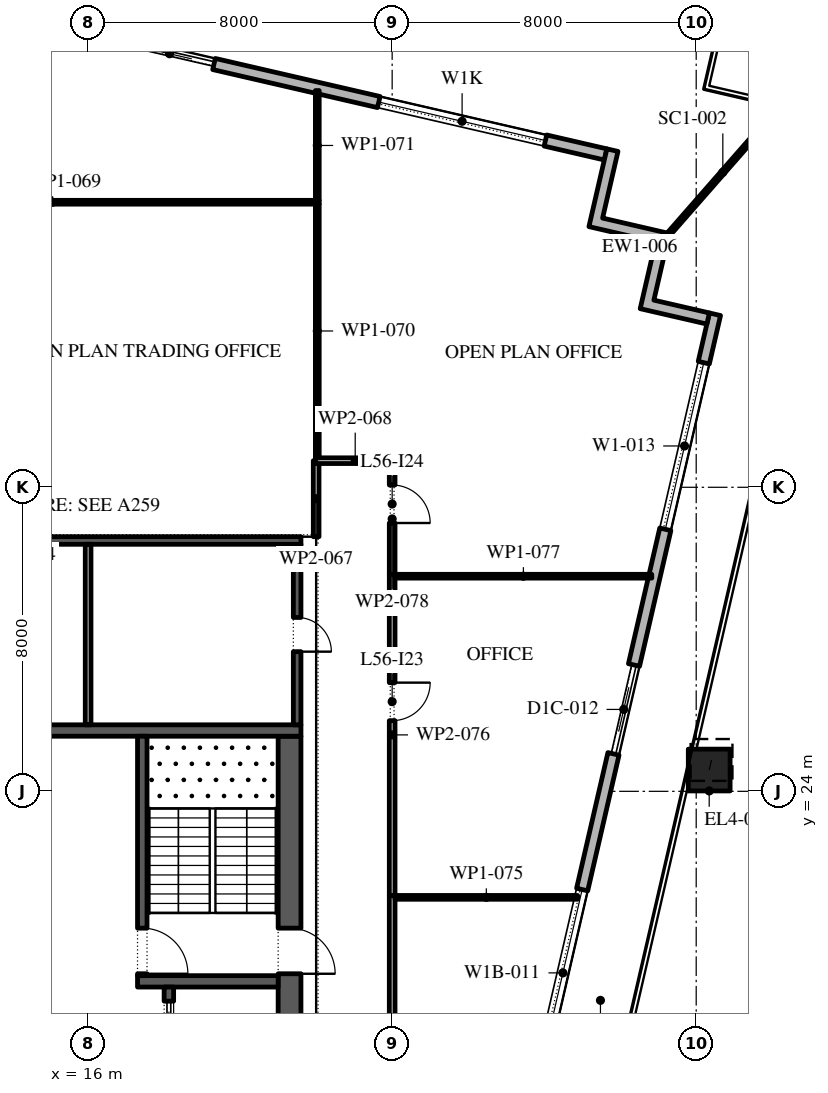
"""IFC4 building model, lengths in metres.
Left out: names, types, materials, properties, quantities, classifications, styles, units other than length and angle.
Written with IfcOpenShell. Run it as: python <this file> out.ifc"""

import sys

from ifc_helpers import new_model, si_unit, direction, frame, frame_2d, origin, origin_2d, place, context, subcontext, project, spatial, polyline, rectangle, outline, extrude, element, fill, save


model = new_model("IFC4")
c1 = context("Model", 3, precision=1e-05, world=origin(), true_north=direction((0.0, 1.0)))
c2 = subcontext(c1, "Body", "Model", "MODEL_VIEW")
j1 = project(units=[si_unit("LENGTHUNIT", "METRE"), si_unit("PLANEANGLEUNIT", "RADIAN")], contexts=[c1])
p1 = place(None, origin())
s1 = spatial("IfcSite", under=j1, at=p1, CompositionType="ELEMENT")
p2 = place(p1, origin())
s2 = spatial("IfcBuilding", under=s1, at=p2, CompositionType="ELEMENT")
p3 = place(p2, frame((0.0, 0.0, 259.8)))
s3 = spatial("IfcBuildingStorey", under=s2, at=p3, CompositionType="ELEMENT", Elevation=259.8)
p4 = place(p3, frame((32.342, 24.56, 0.0), z_axis=(0.014559788571, 0.063169759976, 0.997896584813), x_axis=(-0.97445148511, 0.224598092528, 0.0)))
e1 = element("IfcColumn", 1, at=p4, inside=s3, PredefinedType="COLUMN", context=c2, shape_type="SweptSolid", body=[
    extrude(rectangle(XDim=1.1, YDim=1.1, at=origin_2d()), origin(), (0.0, 0.0, 1.0), 4.209),
])
p5 = place(p3, frame((21.359, -11.678, 0.0), z_axis=(0.0, 0.0, 1.0), x_axis=(0.224949198343, 0.974370493275, 0.0)))
e2 = element("IfcWall", 2, at=p5, inside=s3, PredefinedType="STANDARD", context=c2, shape_type="SweptSolid", body=[
    extrude(rectangle(XDim=49.5, YDim=0.3, at=frame_2d((24.75, 0.0))), origin(), (0.0, 0.0, 1.0), 4.0),
])
p6 = place(p5, frame((1.157, 0.0, 0.45)))
e3 = element("IfcOpeningElement", 3, at=p6, cuts=e2, PredefinedType="OPENING", context=c2, shape_type="SweptSolid", body=[
    extrude(rectangle(XDim=4.5, YDim=3.05, at=frame_2d((2.25, 1.525))), frame((0.0, 0.16, 0.0), z_axis=(0.0, -1.0, 0.0), x_axis=(1.0, 0.0, 0.0)), (0.0, 0.0, 1.0), 0.32),
])
p7 = place(p5, frame((8.121, 0.0, 0.45)))
e4 = element("IfcOpeningElement", 4, at=p7, cuts=e2, PredefinedType="OPENING", context=c2, shape_type="SweptSolid", body=[
    extrude(rectangle(XDim=4.5, YDim=3.05, at=frame_2d((2.25, 1.525))), frame((0.0, 0.16, 0.0), z_axis=(0.0, -1.0, 0.0), x_axis=(1.0, 0.0, 0.0)), (0.0, 0.0, 1.0), 0.32),
])
p8 = place(p5, frame((15.236, 0.0, 0.45)))
e5 = element("IfcOpeningElement", 5, at=p8, cuts=e2, PredefinedType="OPENING", context=c2, shape_type="SweptSolid", body=[
    extrude(rectangle(XDim=4.5, YDim=3.05, at=frame_2d((2.25, 1.525))), frame((0.0, 0.16, 0.0), z_axis=(0.0, -1.0, 0.0), x_axis=(1.0, 0.0, 0.0)), (0.0, 0.0, 1.0), 0.32),
])
p9 = place(p5, frame((22.35, 0.0, 0.45)))
e6 = element("IfcOpeningElement", 6, at=p9, cuts=e2, PredefinedType="OPENING", context=c2, shape_type="SweptSolid", body=[
    extrude(rectangle(XDim=4.5, YDim=3.05, at=frame_2d((2.25, 1.525))), frame((0.0, 0.16, 0.0), z_axis=(0.0, -1.0, 0.0), x_axis=(1.0, 0.0, 0.0)), (0.0, 0.0, 1.0), 0.32),
])
p10 = place(p5, frame((29.464, 0.0, 0.45)))
e7 = element("IfcOpeningElement", 7, at=p10, cuts=e2, PredefinedType="OPENING", context=c2, shape_type="SweptSolid", body=[
    extrude(rectangle(XDim=4.5, YDim=2.95, at=frame_2d((2.25, 1.475))), frame((0.0, 0.16, 0.0), z_axis=(0.0, -1.0, 0.0), x_axis=(1.0, 0.0, 0.0)), (0.0, 0.0, 1.0), 0.32),
])
p11 = place(p5, frame((37.628, 0.0, 0.0)))
e8 = element("IfcOpeningElement", 8, at=p11, cuts=e2, PredefinedType="OPENING", context=c2, shape_type="SweptSolid", body=[
    extrude(rectangle(XDim=2.4, YDim=3.325, at=frame_2d((1.2, 1.663))), frame((0.0, 0.16, 0.0), z_axis=(0.0, -1.0, 0.0), x_axis=(1.0, 0.0, 0.0)), (0.0, 0.0, 1.0), 0.32),
])
p12 = place(p5, frame((43.693, 0.0, 0.45)))
e9 = element("IfcOpeningElement", 9, at=p12, cuts=e2, PredefinedType="OPENING", context=c2, shape_type="SweptSolid", body=[
    extrude(rectangle(XDim=4.5, YDim=3.05, at=frame_2d((2.25, 1.525))), frame((0.0, 0.16, 0.0), z_axis=(0.0, -1.0, 0.0), x_axis=(1.0, 0.0, 0.0)), (0.0, 0.0, 1.0), 0.32),
])
p13 = place(p3, frame((29.616, 40.758, 0.0), z_axis=(0.0, 0.0, 1.0), x_axis=(-0.974370532314, 0.224949029246, 0.0)))
e10 = element("IfcWall", 10, at=p13, inside=s3, PredefinedType="STANDARD", context=c2, shape_type="SweptSolid", body=[
    extrude(rectangle(XDim=48.0, YDim=0.3, at=frame_2d((24.0, 0.0))), origin(), (0.0, 0.0, 1.0), 4.0),
])
p14 = place(p13, frame((1.625, 0.0, 0.45)))
e11 = element("IfcOpeningElement", 11, at=p14, cuts=e10, PredefinedType="OPENING", context=c2, shape_type="SweptSolid", body=[
    extrude(rectangle(XDim=4.5, YDim=2.65, at=frame_2d((2.25, 1.325))), frame((0.0, 0.16, 0.0), z_axis=(0.0, -1.0, 0.0), x_axis=(1.0, 0.0, 0.0)), (0.0, 0.0, 1.0), 0.32),
])
p15 = place(p13, frame((10.575, 0.0, 0.0)))
e12 = element("IfcOpeningElement", 12, at=p15, cuts=e10, PredefinedType="OPENING", context=c2, shape_type="SweptSolid", body=[
    extrude(rectangle(XDim=2.4, YDim=3.5, at=frame_2d((1.2, 1.75))), frame((0.0, 0.16, 0.0), z_axis=(0.0, -1.0, 0.0), x_axis=(1.0, 0.0, 0.0)), (0.0, 0.0, 1.0), 0.32),
])
p16 = place(p13, frame((17.575, 0.0, 0.45)))
e13 = element("IfcOpeningElement", 13, at=p16, cuts=e10, PredefinedType="OPENING", context=c2, shape_type="SweptSolid", body=[
    extrude(rectangle(XDim=4.5, YDim=2.5, at=frame_2d((2.25, 1.25))), frame((0.0, 0.16, 0.0), z_axis=(0.0, -1.0, 0.0), x_axis=(1.0, 0.0, 0.0)), (0.0, 0.0, 1.0), 0.32),
])
p17 = place(p13, frame((25.625, 0.0, 0.45)))
e14 = element("IfcOpeningElement", 14, at=p17, cuts=e10, PredefinedType="OPENING", context=c2, shape_type="SweptSolid", body=[
    extrude(rectangle(XDim=4.5, YDim=2.45, at=frame_2d((2.25, 1.225))), frame((0.0, 0.16, 0.0), z_axis=(0.0, -1.0, 0.0), x_axis=(1.0, 0.0, 0.0)), (0.0, 0.0, 1.0), 0.32),
])
p18 = place(p13, frame((33.675, 0.0, 0.45)))
e15 = element("IfcOpeningElement", 15, at=p18, cuts=e10, PredefinedType="OPENING", context=c2, shape_type="SweptSolid", body=[
    extrude(rectangle(XDim=4.5, YDim=2.45, at=frame_2d((2.25, 1.225))), frame((0.0, 0.16, 0.0), z_axis=(0.0, -1.0, 0.0), x_axis=(1.0, 0.0, 0.0)), (0.0, 0.0, 1.0), 0.32),
])
p19 = place(p13, frame((42.775, 0.0, 0.0)))
e16 = element("IfcOpeningElement", 16, at=p19, cuts=e10, PredefinedType="OPENING", context=c2, shape_type="SweptSolid", body=[
    extrude(rectangle(XDim=2.4, YDim=3.5, at=frame_2d((1.2, 1.75))), frame((0.0, 0.16, 0.0), z_axis=(0.0, -1.0, 0.0), x_axis=(1.0, 0.0, 0.0)), (0.0, 0.0, 1.0), 0.32),
])
p20 = place(p3, origin())
e17 = element("IfcWall", 17, at=p20, inside=s3, PredefinedType="STANDARD", context=c2, shape_type="SweptSolid", body=[
    extrude(outline(polyline([(30.931, 38.453), (29.177, 38.858), (29.65, 40.905), (29.942, 40.837), (29.537, 39.083), (31.291, 38.678), (30.886, 36.924), (32.348, 36.587), (32.28, 36.295), (30.526, 36.699), (30.931, 38.453)])), origin(), (0.0, 0.0, 1.0), 4.0),
])
p21 = place(p3, frame((31.291, 38.678, -0.05), z_axis=(0.0, 0.0, 1.0), x_axis=(0.658944865364, 0.752191241913, 0.0)))
e18 = element("IfcWall", 18, at=p21, inside=s3, PredefinedType="STANDARD", context=c2, shape_type="SweptSolid", body=[
    extrude(rectangle(XDim=4.278, YDim=0.1, at=frame_2d((2.139, 0.0))), origin(), (0.0, 0.0, 1.0), 4.05),
])
p22 = place(p3, frame((21.3, -2.45, 0.0), z_axis=(0.0, 0.0, 1.0), x_axis=(0.0, 1.0, 0.0)))
e19 = element("IfcWall", 19, at=p22, inside=s3, PredefinedType="SHEAR", context=c2, shape_type="SweptSolid", body=[
    extrude(rectangle(XDim=27.9, YDim=0.6, at=frame_2d((13.95, 0.0))), origin(), (0.0, 0.0, 1.0), 4.0),
])
p23 = place(p22, frame((5.05, 0.0, 0.0)))
e20 = element("IfcOpeningElement", 20, at=p23, cuts=e19, PredefinedType="OPENING", context=c2, shape_type="SweptSolid", body=[
    extrude(rectangle(XDim=1.2, YDim=2.1, at=frame_2d((0.6, 1.05))), frame((0.0, 0.31, 0.0), z_axis=(0.0, -1.0, 0.0), x_axis=(1.0, 0.0, 0.0)), (0.0, 0.0, 1.0), 0.62),
])
p24 = place(p22, frame((21.65, 0.0, 0.0)))
e21 = element("IfcOpeningElement", 21, at=p24, cuts=e19, PredefinedType="OPENING", context=c2, shape_type="SweptSolid", body=[
    extrude(rectangle(XDim=1.2, YDim=2.1, at=frame_2d((0.6, 1.05))), frame((0.0, 0.31, 0.0), z_axis=(0.0, -1.0, 0.0), x_axis=(1.0, 0.0, 0.0)), (0.0, 0.0, 1.0), 0.62),
])
p25 = place(p3, frame((10.4, 25.6, 0.0), z_axis=(0.0, 0.0, 1.0), x_axis=(1.0, 0.0, 0.0)))
e22 = element("IfcWall", 22, at=p25, inside=s3, PredefinedType="SHEAR", context=c2, shape_type="SweptSolid", body=[
    extrude(rectangle(XDim=11.2, YDim=0.3, at=frame_2d((5.6, 0.0))), origin(), (0.0, 0.0, 1.0), 4.0),
])
p26 = place(p3, frame((17.3, 19.0, 0.0), z_axis=(0.0, 0.0, 1.0), x_axis=(1.0, 0.0, 0.0)))
e23 = element("IfcWall", 23, at=p26, inside=s3, PredefinedType="SHEAR", context=c2, shape_type="SweptSolid", body=[
    extrude(rectangle(XDim=3.7, YDim=0.3, at=frame_2d((1.85, 0.0))), origin(), (0.0, 0.0, 1.0), 4.0),
])
p27 = place(p3, frame((17.425, 19.15, 0.0), z_axis=(0.0, 0.0, 1.0), x_axis=(0.0, 1.0, 0.0)))
e24 = element("IfcWall", 24, at=p27, inside=s3, PredefinedType="SHEAR", context=c2, shape_type="SweptSolid", body=[
    extrude(rectangle(XDim=6.3, YDim=0.25, at=frame_2d((3.15, 0.0))), origin(), (0.0, 0.0, 1.0), 4.0),
])
p28 = place(p27, frame((0.05, 0.0, 0.0)))
e25 = element("IfcOpeningElement", 25, at=p28, cuts=e24, PredefinedType="OPENING", context=c2, shape_type="SweptSolid", body=[
    extrude(rectangle(XDim=1.2, YDim=2.1, at=frame_2d((0.6, 1.05))), frame((0.0, 0.135, 0.0), z_axis=(0.0, -1.0, 0.0), x_axis=(1.0, 0.0, 0.0)), (0.0, 0.0, 1.0), 0.27),
])
p29 = place(p3, frame((18.125, 4.15, 0.0), z_axis=(0.0, 0.0, 1.0), x_axis=(0.0, 1.0, 0.0)))
e26 = element("IfcWall", 26, at=p29, inside=s3, PredefinedType="SHEAR", context=c2, shape_type="SweptSolid", body=[
    extrude(rectangle(XDim=14.7, YDim=0.25, at=frame_2d((7.35, 0.0))), origin(), (0.0, 0.0, 1.0), 4.0),
])
p30 = place(p29, frame((3.246, 0.0, 0.0)))
e27 = element("IfcOpeningElement", 27, at=p30, cuts=e26, PredefinedType="OPENING", context=c2, shape_type="SweptSolid", body=[
    extrude(rectangle(XDim=0.9, YDim=2.1, at=frame_2d((0.45, 1.05))), frame((0.0, 0.135, 0.0), z_axis=(0.0, -1.0, 0.0), x_axis=(1.0, 0.0, 0.0)), (0.0, 0.0, 1.0), 0.27),
])
p31 = place(p29, frame((8.454, 0.0, 0.0)))
e28 = element("IfcOpeningElement", 28, at=p31, cuts=e26, PredefinedType="OPENING", context=c2, shape_type="SweptSolid", body=[
    extrude(rectangle(XDim=0.9, YDim=2.1, at=frame_2d((0.45, 1.05))), frame((0.0, 0.135, 0.0), z_axis=(0.0, -1.0, 0.0), x_axis=(1.0, 0.0, 0.0)), (0.0, 0.0, 1.0), 0.27),
])
p32 = place(p29, frame((0.371, 0.0, 0.0)))
e29 = element("IfcOpeningElement", 29, at=p32, cuts=e26, PredefinedType="OPENING", context=c2, shape_type="SweptSolid", body=[
    extrude(rectangle(XDim=1.1, YDim=2.1, at=frame_2d((0.55, 1.05))), frame((0.0, 0.135, 0.0), z_axis=(0.0, -1.0, 0.0), x_axis=(1.0, 0.0, 0.0)), (0.0, 0.0, 1.0), 0.27),
])
p33 = place(p29, frame((13.229, 0.0, 0.0)))
e30 = element("IfcOpeningElement", 30, at=p33, cuts=e26, PredefinedType="OPENING", context=c2, shape_type="SweptSolid", body=[
    extrude(rectangle(XDim=1.1, YDim=2.1, at=frame_2d((0.55, 1.05))), frame((0.0, 0.135, 0.0), z_axis=(0.0, -1.0, 0.0), x_axis=(1.0, 0.0, 0.0)), (0.0, 0.0, 1.0), 0.27),
])
p34 = place(p3, frame((21.5, 25.75, 0.0), z_axis=(0.0, 0.0, 1.0), x_axis=(0.0, 1.0, 0.0)))
e31 = element("IfcWall", 31, at=p34, inside=s3, PredefinedType="SHEAR", context=c2, shape_type="SweptSolid", body=[
    extrude(rectangle(XDim=4.75, YDim=0.2, at=frame_2d((2.375, 0.0))), origin(), (0.0, 0.0, 1.0), 4.0),
])
p35 = place(p34, frame((1.925, 0.0, 0.0)))
e32 = element("IfcOpeningElement", 32, at=p35, cuts=e31, PredefinedType="OPENING", context=c2, shape_type="SweptSolid", body=[
    extrude(rectangle(XDim=0.9, YDim=2.1, at=frame_2d((0.45, 1.05))), frame((0.0, 0.11, 0.0), z_axis=(0.0, -1.0, 0.0), x_axis=(1.0, 0.0, 0.0)), (0.0, 0.0, 1.0), 0.22),
])
p36 = place(p3, frame((10.4, 30.6, 0.0), z_axis=(0.0, 0.0, 1.0), x_axis=(1.0, 0.0, 0.0)))
e33 = element("IfcWall", 33, at=p36, inside=s3, PredefinedType="SHEAR", context=c2, shape_type="SweptSolid", body=[
    extrude(rectangle(XDim=11.2, YDim=0.2, at=frame_2d((5.6, 0.0))), origin(), (0.0, 0.0, 1.0), 4.0),
])
p37 = place(p3, frame((16.0, 25.75, 0.0), z_axis=(0.0, 0.0, 1.0), x_axis=(0.0, 1.0, 0.0)))
e34 = element("IfcWall", 34, at=p37, inside=s3, PredefinedType="PARTITIONING", context=c2, shape_type="SweptSolid", body=[
    extrude(rectangle(XDim=4.75, YDim=0.15, at=frame_2d((2.375, 0.0))), origin(), (0.0, 0.0, 1.0), 4.0),
])
p38 = place(p3, frame((22.0, 30.7, 0.0), z_axis=(0.0, 0.0, 1.0), x_axis=(0.0, 1.0, 0.0)))
e35 = element("IfcWall", 35, at=p38, inside=s3, PredefinedType="PARTITIONING", context=c2, shape_type="SweptSolid", body=[
    extrude(rectangle(XDim=2.0, YDim=0.15, at=frame_2d((1.0, 0.0))), origin(), (0.0, 0.0, 1.0), 4.0),
])
p39 = place(p3, frame((21.98, 32.7, 0.0), z_axis=(0.0, 0.0, 1.0), x_axis=(1.0, 0.0, 0.0)))
e36 = element("IfcWall", 36, at=p39, inside=s3, PredefinedType="PARTITIONING", context=c2, shape_type="SweptSolid", body=[
    extrude(rectangle(XDim=2.095, YDim=0.15, at=frame_2d((1.047, 0.0))), origin(), (0.0, 0.0, 1.0), 4.0),
])
p40 = place(p3, frame((22.08, 39.5, 0.0), z_axis=(0.0, 0.0, 1.0), x_axis=(-1.0, 0.0, 0.0)))
e37 = element("IfcWall", 37, at=p40, inside=s3, PredefinedType="PARTITIONING", context=c2, shape_type="SweptSolid", body=[
    extrude(rectangle(XDim=14.03, YDim=0.1, at=frame_2d((7.015, 0.0))), origin(), (0.0, 0.0, 1.0), 4.0),
])
p41 = place(p40, frame((8.0, 0.0, 0.0)))
e38 = element("IfcOpeningElement", 38, at=p41, cuts=e37, PredefinedType="OPENING", context=c2, shape_type="SweptSolid", body=[
    extrude(rectangle(XDim=0.9, YDim=2.1, at=frame_2d((0.45, 1.05))), frame((0.0, 0.06, 0.0), z_axis=(0.0, -1.0, 0.0), x_axis=(1.0, 0.0, 0.0)), (0.0, 0.0, 1.0), 0.12),
])
p42 = place(p3, frame((22.03, 39.45, 0.0), z_axis=(0.0, 0.0, 1.0), x_axis=(0.0, -1.0, 0.0)))
e39 = element("IfcWall", 39, at=p42, inside=s3, PredefinedType="PARTITIONING", context=c2, shape_type="SweptSolid", body=[
    extrude(rectangle(XDim=6.675, YDim=0.1, at=frame_2d((3.337, 0.0))), origin(), (0.0, 0.0, 1.0), 4.0),
])
p43 = place(p3, frame((22.03, 42.438, 0.0), z_axis=(0.0, 0.0, 1.0), x_axis=(0.0, -1.0, 0.0)))
e40 = element("IfcWall", 40, at=p43, inside=s3, PredefinedType="PARTITIONING", context=c2, shape_type="SweptSolid", body=[
    extrude(rectangle(XDim=2.888, YDim=0.1, at=frame_2d((1.444, 0.0))), origin(), (0.0, 0.0, 1.0), 4.0),
])
p44 = place(p3, frame((24.0, 21.26, 0.0), z_axis=(0.0, 0.0, 1.0), x_axis=(0.0, -1.0, 0.0)))
e41 = element("IfcWall", 41, at=p44, inside=s3, PredefinedType="PARTITIONING", context=c2, shape_type="SweptSolid", body=[
    extrude(rectangle(XDim=17.455, YDim=0.15, at=frame_2d((8.728, 0.0))), origin(), (0.0, 0.0, 1.0), 4.0),
])
p45 = place(p44, frame((11.88, 0.0, 0.0)))
e42 = element("IfcOpeningElement", 42, at=p45, cuts=e41, PredefinedType="OPENING", context=c2, shape_type="SweptSolid", body=[
    extrude(rectangle(XDim=1.0, YDim=2.1, at=frame_2d((0.5, 1.05))), frame((0.0, 0.085, 0.0), z_axis=(0.0, -1.0, 0.0), x_axis=(1.0, 0.0, 0.0)), (0.0, 0.0, 1.0), 0.17),
])
p46 = place(p3, frame((24.075, 21.21, 0.0), z_axis=(0.0, 0.0, 1.0), x_axis=(1.0, 0.0, 0.0)))
e43 = element("IfcWall", 43, at=p46, inside=s3, PredefinedType="PARTITIONING", context=c2, shape_type="SweptSolid", body=[
    extrude(rectangle(XDim=4.805, YDim=0.1, at=frame_2d((2.402, 0.0))), origin(), (0.0, 0.0, 1.0), 4.0),
])
p47 = place(p3, frame((24.0, 29.71, 0.0), z_axis=(0.0, 0.0, 1.0), x_axis=(0.0, -1.0, 0.0)))
e44 = element("IfcWall", 44, at=p47, inside=s3, PredefinedType="PARTITIONING", context=c2, shape_type="SweptSolid", body=[
    extrude(rectangle(XDim=8.45, YDim=0.15, at=frame_2d((4.225, 0.0))), origin(), (0.0, 0.0, 1.0), 4.0),
])
p48 = place(p47, frame((2.85, 0.0, 0.0)))
e45 = element("IfcOpeningElement", 45, at=p48, cuts=e44, PredefinedType="OPENING", context=c2, shape_type="SweptSolid", body=[
    extrude(rectangle(XDim=1.0, YDim=2.1, at=frame_2d((0.5, 1.05))), frame((0.0, 0.085, 0.0), z_axis=(0.0, -1.0, 0.0), x_axis=(1.0, 0.0, 0.0)), (0.0, 0.0, 1.0), 0.17),
])
p49 = place(p3, frame((24.075, 29.66, 0.0), z_axis=(0.0, 0.0, 1.0), x_axis=(1.0, 0.0, 0.0)))
e46 = element("IfcWall", 46, at=p49, inside=s3, PredefinedType="PARTITIONING", context=c2, shape_type="SweptSolid", body=[
    extrude(rectangle(XDim=6.756, YDim=0.1, at=frame_2d((3.378, 0.0))), origin(), (0.0, 0.0, 1.0), 4.0),
])
p50 = place(p3, frame((24.0, 32.625, 0.0), z_axis=(0.0, 0.0, 1.0), x_axis=(0.0, -1.0, 0.0)))
e47 = element("IfcWall", 47, at=p50, inside=s3, PredefinedType="PARTITIONING", context=c2, shape_type="SweptSolid", body=[
    extrude(rectangle(XDim=2.915, YDim=0.15, at=frame_2d((1.458, 0.0))), origin(), (0.0, 0.0, 1.0), 4.0),
])
p51 = place(p50, frame((0.565, 0.0, 0.0)))
e48 = element("IfcOpeningElement", 48, at=p51, cuts=e47, PredefinedType="OPENING", context=c2, shape_type="SweptSolid", body=[
    extrude(rectangle(XDim=1.0, YDim=2.1, at=frame_2d((0.5, 1.05))), frame((0.0, 0.085, 0.0), z_axis=(0.0, -1.0, 0.0), x_axis=(1.0, 0.0, 0.0)), (0.0, 0.0, 1.0), 0.17),
])
p52 = place(p10, origin())
e49 = element("IfcWindow", 49, at=p52, inside=s3, PartitioningType="DOUBLE_PANEL_VERTICAL", PredefinedType="WINDOW", context=c2, shape_type="SweptSolid", body=[
    extrude(rectangle(XDim=4.5, YDim=2.95, at=frame_2d((2.25, 1.475))), frame((0.0, 0.03, 0.0), z_axis=(0.0, -1.0, 0.0), x_axis=(1.0, 0.0, 0.0)), (0.0, 0.0, 1.0), 0.06),
])
fill(e7, e49)
p53 = place(p11, origin())
e50 = element("IfcDoor", 50, at=p53, inside=s3, OperationType="DOUBLE_DOOR_SLIDING", PredefinedType="DOOR", context=c2, shape_type="SweptSolid", body=[
    extrude(rectangle(XDim=2.4, YDim=3.325, at=frame_2d((1.2, 1.663))), frame((0.0, 0.025, 0.0), z_axis=(0.0, -1.0, 0.0), x_axis=(1.0, 0.0, 0.0)), (0.0, 0.0, 1.0), 0.05),
])
fill(e8, e50)
p54 = place(p12, origin())
e51 = element("IfcWindow", 51, at=p54, inside=s3, PartitioningType="DOUBLE_PANEL_VERTICAL", PredefinedType="WINDOW", context=c2, shape_type="SweptSolid", body=[
    extrude(rectangle(XDim=4.5, YDim=3.05, at=frame_2d((2.25, 1.525))), frame((0.0, 0.03, 0.0), z_axis=(0.0, -1.0, 0.0), x_axis=(1.0, 0.0, 0.0)), (0.0, 0.0, 1.0), 0.06),
])
fill(e9, e51)
p55 = place(p14, origin())
e52 = element("IfcWindow", 52, at=p55, inside=s3, PartitioningType="DOUBLE_PANEL_VERTICAL", PredefinedType="WINDOW", context=c2, shape_type="SweptSolid", body=[
    extrude(rectangle(XDim=4.5, YDim=2.65, at=frame_2d((2.25, 1.325))), frame((0.0, 0.03, 0.0), z_axis=(0.0, -1.0, 0.0), x_axis=(1.0, 0.0, 0.0)), (0.0, 0.0, 1.0), 0.06),
])
fill(e11, e52)
p56 = place(p15, origin())
e53 = element("IfcDoor", 53, at=p56, inside=s3, OperationType="DOUBLE_DOOR_SLIDING", PredefinedType="DOOR", context=c2, shape_type="SweptSolid", body=[
    extrude(rectangle(XDim=2.4, YDim=3.5, at=frame_2d((1.2, 1.75))), frame((0.0, 0.025, 0.0), z_axis=(0.0, -1.0, 0.0), x_axis=(1.0, 0.0, 0.0)), (0.0, 0.0, 1.0), 0.05),
])
fill(e12, e53)
p57 = place(p33, origin())
e54 = element("IfcDoor", 54, at=p57, inside=s3, OperationType="SLIDING_TO_LEFT", PredefinedType="DOOR", context=c2, shape_type="SweptSolid", body=[
    extrude(rectangle(XDim=1.1, YDim=2.1, at=frame_2d((0.55, 1.05))), frame((0.0, 0.025, 0.0), z_axis=(0.0, -1.0, 0.0), x_axis=(1.0, 0.0, 0.0)), (0.0, 0.0, 1.0), 0.05),
])
fill(e30, e54)
p58 = place(p28, frame((1.2, 0.0, 0.0), z_axis=(0.0, 0.0, 1.0), x_axis=(-1.0, 0.0, 0.0)))
e55 = element("IfcDoor", 55, at=p58, inside=s3, OperationType="SINGLE_SWING_LEFT", PredefinedType="DOOR", context=c2, shape_type="SweptSolid", body=[
    extrude(rectangle(XDim=1.2, YDim=2.1, at=frame_2d((0.6, 1.05))), frame((0.0, 0.025, 0.0), z_axis=(0.0, -1.0, 0.0), x_axis=(1.0, 0.0, 0.0)), (0.0, 0.0, 1.0), 0.05),
])
fill(e25, e55)
p59 = place(p24, frame((1.2, 0.0, 0.0), z_axis=(0.0, 0.0, 1.0), x_axis=(-1.0, 0.0, 0.0)))
e56 = element("IfcDoor", 56, at=p59, inside=s3, OperationType="SINGLE_SWING_LEFT", PredefinedType="DOOR", context=c2, shape_type="SweptSolid", body=[
    extrude(rectangle(XDim=1.2, YDim=2.1, at=frame_2d((0.6, 1.05))), frame((0.0, 0.025, 0.0), z_axis=(0.0, -1.0, 0.0), x_axis=(1.0, 0.0, 0.0)), (0.0, 0.0, 1.0), 0.05),
])
fill(e21, e56)
p60 = place(p35, frame((0.9, 0.15, 0.0), z_axis=(0.0, 0.0, 1.0), x_axis=(-1.0, 0.0, 0.0)))
e57 = element("IfcDoor", 57, at=p60, inside=s3, OperationType="SINGLE_SWING_LEFT", PredefinedType="DOOR", context=c2, shape_type="SweptSolid", body=[
    extrude(rectangle(XDim=0.9, YDim=2.1, at=frame_2d((0.45, 1.05))), frame((0.0, 0.1, 0.0), z_axis=(0.0, -1.0, 0.0), x_axis=(1.0, 0.0, 0.0)), (0.0, 0.0, 1.0), 0.05),
])
fill(e32, e57)
p61 = place(p48, origin())
e58 = element("IfcDoor", 58, at=p61, inside=s3, OperationType="SINGLE_SWING_RIGHT", PredefinedType="DOOR", context=c2, shape_type="SweptSolid", body=[
    extrude(rectangle(XDim=1.0, YDim=2.1, at=frame_2d((0.5, 1.05))), frame((0.0, 0.025, 0.0), z_axis=(0.0, -1.0, 0.0), x_axis=(1.0, 0.0, 0.0)), (0.0, 0.0, 1.0), 0.05),
])
fill(e45, e58)
p62 = place(p51, origin())
e59 = element("IfcDoor", 59, at=p62, inside=s3, OperationType="SINGLE_SWING_LEFT", PredefinedType="DOOR", context=c2, shape_type="SweptSolid", body=[
    extrude(rectangle(XDim=1.0, YDim=2.1, at=frame_2d((0.5, 1.05))), frame((0.0, 0.025, 0.0), z_axis=(0.0, -1.0, 0.0), x_axis=(1.0, 0.0, 0.0)), (0.0, 0.0, 1.0), 0.05),
])
fill(e48, e59)
save(model, sys.argv[1])
